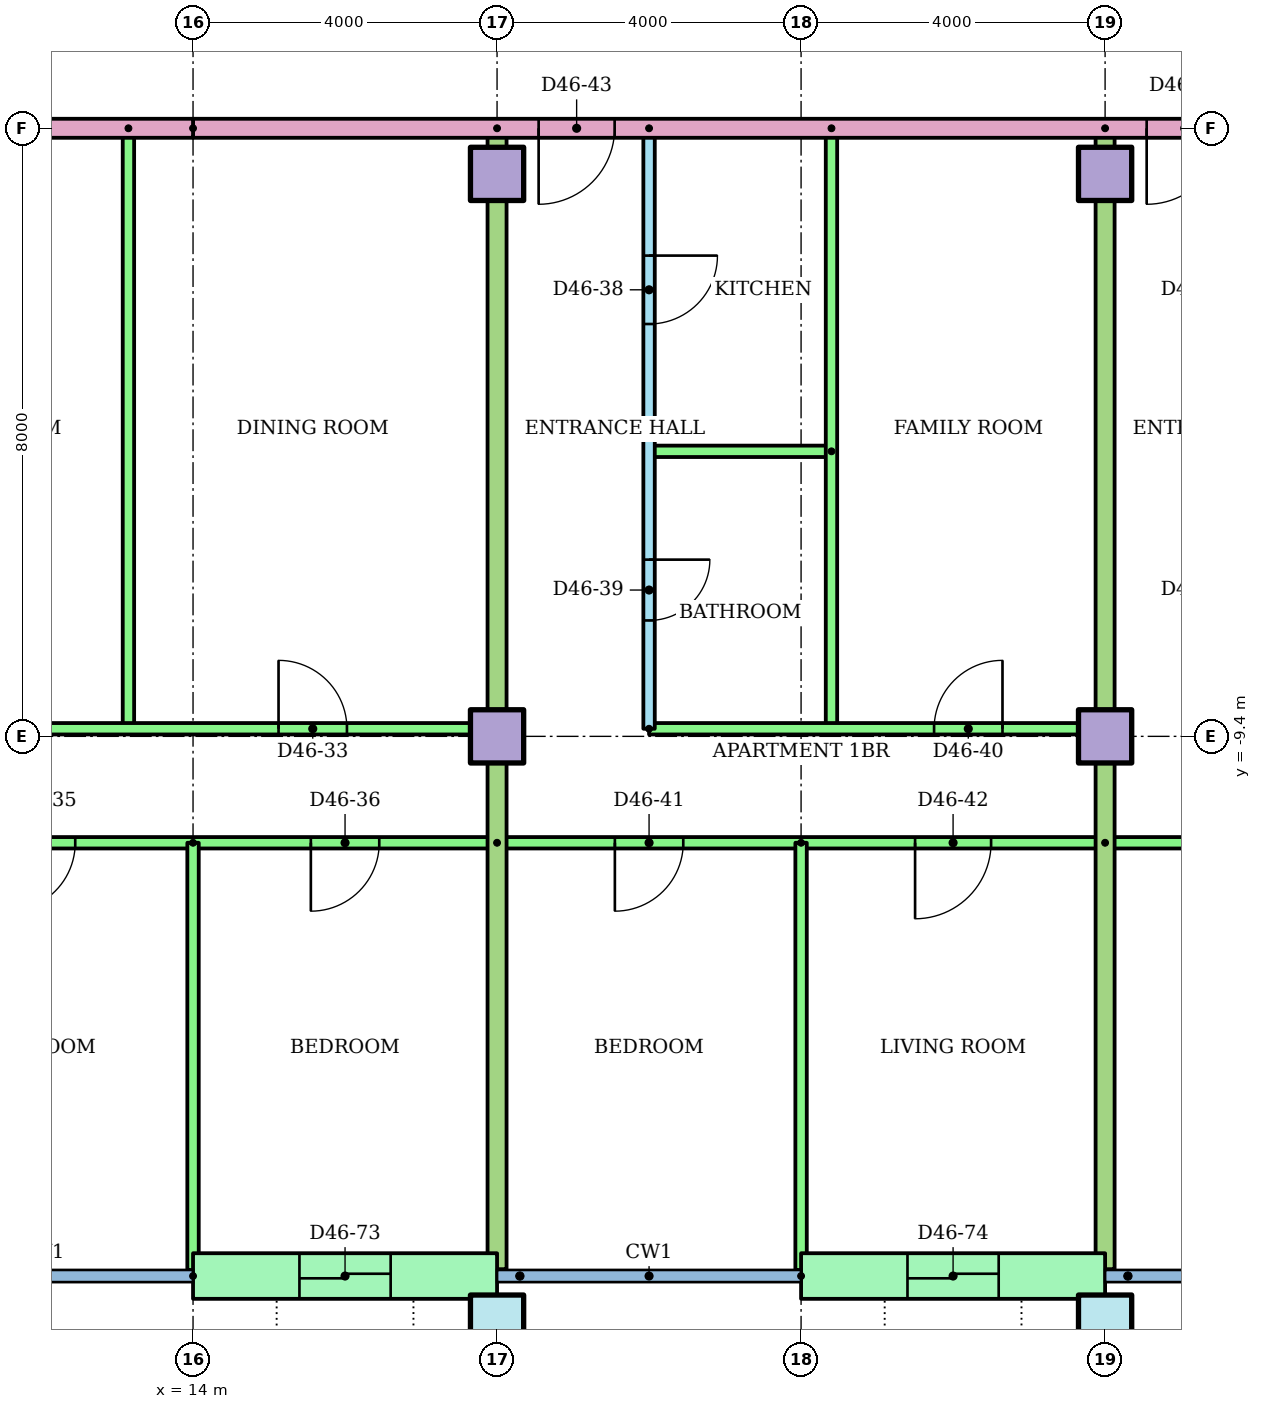
"""IFC4 building model, lengths in metres.
Left out: names, types, materials, properties, quantities, classifications, styles, units other than length and angle.
Written with IfcOpenShell. Run it as: python <this file> out.ifc"""

import sys

from ifc_helpers import new_model, si_unit, direction, frame, frame_2d, origin, origin_2d, place, context, subcontext, project, spatial, rectangle, hollow_rectangle, extrude, element, fill, save


model = new_model("IFC4")
c1 = context("Model", 3, precision=1e-05, world=origin(), true_north=direction((0.0, 1.0)))
c2 = subcontext(c1, "Body", "Model", "MODEL_VIEW")
j1 = project(units=[si_unit("LENGTHUNIT", "METRE"), si_unit("PLANEANGLEUNIT", "RADIAN")], contexts=[c1])
p1 = place(None, origin())
s1 = spatial("IfcSite", under=j1, at=p1, CompositionType="ELEMENT")
p2 = place(p1, origin())
s2 = spatial("IfcBuilding", under=s1, at=p2, CompositionType="ELEMENT")
p3 = place(p2, frame((0.0, 0.0, 178.1)))
s3 = spatial("IfcBuildingStorey", under=s2, at=p3, CompositionType="ELEMENT", Elevation=178.1)
for number, where in (
    (1, (18.0, -17.1, 0.0)),
    (2, (26.0, -17.1, 0.0)),
):
    element("IfcColumn", number, at=place(p3, frame(where)), inside=s3, PredefinedType="COLUMN", context=c2, shape_type="SweptSolid", body=[
        extrude(hollow_rectangle(XDim=0.7, YDim=0.7, WallThickness=0.036, at=origin_2d()), origin(), (0.0, 0.0, 1.0), 3.2),
    ])
for number, where in (
    (3, (18.0, -9.4, 0.0)),
    (4, (26.0, -9.4, 0.0)),
    (5, (18.0, -2.0, 0.0)),
    (6, (26.0, -2.0, 0.0)),
):
    element("IfcColumn", number, at=place(p3, frame(where)), inside=s3, PredefinedType="COLUMN", context=c2, shape_type="SweptSolid", body=[
        extrude(rectangle(XDim=0.7, YDim=0.7, at=origin_2d()), origin(), (0.0, 0.0, 1.0), 3.2),
    ])
p4 = place(p3, frame((14.0, -16.5, 0.0)))
e7 = element("IfcWall", 7, at=p4, inside=s3, PredefinedType="STANDARD", context=c2, shape_type="SweptSolid", body=[
    extrude(rectangle(XDim=4.0, YDim=0.6, at=frame_2d((2.0, 0.0))), origin(), (0.0, 0.0, 1.0), 2.92),
])
p5 = place(p4, frame((1.4, 0.0, 0.0)))
e8 = element("IfcOpeningElement", 8, at=p5, cuts=e7, PredefinedType="OPENING", context=c2, shape_type="SweptSolid", body=[
    extrude(rectangle(XDim=1.2, YDim=2.1, at=frame_2d((0.6, 1.05))), frame((0.0, 0.31, 0.0), z_axis=(0.0, -1.0, 0.0), x_axis=(1.0, 0.0, 0.0)), (0.0, 0.0, 1.0), 0.62),
])
p6 = place(p3, frame((22.0, -16.5, 0.0)))
e9 = element("IfcWall", 9, at=p6, inside=s3, PredefinedType="STANDARD", context=c2, shape_type="SweptSolid", body=[
    extrude(rectangle(XDim=4.0, YDim=0.6, at=frame_2d((2.0, 0.0))), origin(), (0.0, 0.0, 1.0), 2.92),
])
p7 = place(p6, frame((1.4, 0.0, 0.0)))
e10 = element("IfcOpeningElement", 10, at=p7, cuts=e9, PredefinedType="OPENING", context=c2, shape_type="SweptSolid", body=[
    extrude(rectangle(XDim=1.2, YDim=2.1, at=frame_2d((0.6, 1.05))), frame((0.0, 0.31, 0.0), z_axis=(0.0, -1.0, 0.0), x_axis=(1.0, 0.0, 0.0)), (0.0, 0.0, 1.0), 0.62),
])
p8 = place(p3, frame((13.15, -1.4, 0.0), z_axis=(0.0, 0.0, 1.0), x_axis=(0.0, -1.0, 0.0)))
e11 = element("IfcWall", 11, at=p8, inside=s3, PredefinedType="PARTITIONING", context=c2, shape_type="SweptSolid", body=[
    extrude(rectangle(XDim=7.9, YDim=0.15, at=frame_2d((3.95, 0.0))), origin(), (0.0, 0.0, 1.0), 2.4),
])
p9 = place(p3, frame((4.0, -9.3, 0.0)))
e12 = element("IfcWall", 12, at=p9, inside=s3, PredefinedType="PARTITIONING", context=c2, shape_type="SweptSolid", body=[
    extrude(rectangle(XDim=14.0, YDim=0.15, at=frame_2d((7.0, 0.0))), origin(), (0.0, 0.0, 1.0), 2.4),
])
p10 = place(p9, frame((3.45, 0.0, 0.0)))
e13 = element("IfcOpeningElement", 13, at=p10, cuts=e12, PredefinedType="OPENING", context=c2, shape_type="SweptSolid", body=[
    extrude(rectangle(XDim=0.9, YDim=2.1, at=frame_2d((0.45, 1.05))), frame((0.0, 0.085, 0.0), z_axis=(0.0, -1.0, 0.0), x_axis=(1.0, 0.0, 0.0)), (0.0, 0.0, 1.0), 0.17),
])
p11 = place(p9, frame((6.825, 0.0, 0.0)))
e14 = element("IfcOpeningElement", 14, at=p11, cuts=e12, PredefinedType="OPENING", context=c2, shape_type="SweptSolid", body=[
    extrude(rectangle(XDim=0.9, YDim=2.1, at=frame_2d((0.45, 1.05))), frame((0.0, 0.085, 0.0), z_axis=(0.0, -1.0, 0.0), x_axis=(1.0, 0.0, 0.0)), (0.0, 0.0, 1.0), 0.17),
])
p12 = place(p9, frame((11.125, 0.0, 0.0)))
e15 = element("IfcOpeningElement", 15, at=p12, cuts=e12, PredefinedType="OPENING", context=c2, shape_type="SweptSolid", body=[
    extrude(rectangle(XDim=0.9, YDim=2.1, at=frame_2d((0.45, 1.05))), frame((0.0, 0.085, 0.0), z_axis=(0.0, -1.0, 0.0), x_axis=(1.0, 0.0, 0.0)), (0.0, 0.0, 1.0), 0.17),
])
p13 = place(p3, frame((18.0, -10.8, 0.0), z_axis=(0.0, 0.0, 1.0), x_axis=(-1.0, 0.0, 0.0)))
e16 = element("IfcWall", 16, at=p13, inside=s3, PredefinedType="PARTITIONING", context=c2, shape_type="SweptSolid", body=[
    extrude(rectangle(XDim=16.0, YDim=0.15, at=frame_2d((8.0, 0.0))), origin(), (0.0, 0.0, 1.0), 2.4),
])
p14 = place(p13, frame((11.5, 0.0, 0.0)))
e17 = element("IfcOpeningElement", 17, at=p14, cuts=e16, PredefinedType="OPENING", context=c2, shape_type="SweptSolid", body=[
    extrude(rectangle(XDim=1.0, YDim=2.1, at=frame_2d((0.5, 1.05))), frame((0.0, 0.085, 0.0), z_axis=(0.0, -1.0, 0.0), x_axis=(1.0, 0.0, 0.0)), (0.0, 0.0, 1.0), 0.17),
])
p15 = place(p13, frame((5.55, 0.0, 0.0)))
e18 = element("IfcOpeningElement", 18, at=p15, cuts=e16, PredefinedType="OPENING", context=c2, shape_type="SweptSolid", body=[
    extrude(rectangle(XDim=0.9, YDim=2.1, at=frame_2d((0.45, 1.05))), frame((0.0, 0.085, 0.0), z_axis=(0.0, -1.0, 0.0), x_axis=(1.0, 0.0, 0.0)), (0.0, 0.0, 1.0), 0.17),
])
p16 = place(p13, frame((1.55, 0.0, 0.0)))
e19 = element("IfcOpeningElement", 19, at=p16, cuts=e16, PredefinedType="OPENING", context=c2, shape_type="SweptSolid", body=[
    extrude(rectangle(XDim=0.9, YDim=2.1, at=frame_2d((0.45, 1.05))), frame((0.0, 0.085, 0.0), z_axis=(0.0, -1.0, 0.0), x_axis=(1.0, 0.0, 0.0)), (0.0, 0.0, 1.0), 0.17),
])
p17 = place(p3, frame((14.0, -10.8, 0.0), z_axis=(0.0, 0.0, 1.0), x_axis=(0.0, -1.0, 0.0)))
e20 = element("IfcWall", 20, at=p17, inside=s3, PredefinedType="PARTITIONING", context=c2, shape_type="SweptSolid", body=[
    extrude(rectangle(XDim=5.621, YDim=0.15, at=frame_2d((2.811, 0.0))), origin(), (0.0, 0.0, 1.0), 2.4),
])
p18 = place(p3, frame((20.0, -1.4, 0.0), z_axis=(0.0, 0.0, 1.0), x_axis=(0.0, -1.0, 0.0)))
e21 = element("IfcWall", 21, at=p18, inside=s3, PredefinedType="PARTITIONING", context=c2, shape_type="SweptSolid", body=[
    extrude(rectangle(XDim=7.9, YDim=0.15, at=frame_2d((3.95, 0.0))), origin(), (0.0, 0.0, 1.0), 2.4),
])
p19 = place(p18, frame((1.675, 0.0, 0.0)))
e22 = element("IfcOpeningElement", 22, at=p19, cuts=e21, PredefinedType="OPENING", context=c2, shape_type="SweptSolid", body=[
    extrude(rectangle(XDim=0.9, YDim=2.1, at=frame_2d((0.45, 1.05))), frame((0.0, 0.085, 0.0), z_axis=(0.0, -1.0, 0.0), x_axis=(1.0, 0.0, 0.0)), (0.0, 0.0, 1.0), 0.17),
])
p20 = place(p18, frame((5.675, 0.0, 0.0)))
e23 = element("IfcOpeningElement", 23, at=p20, cuts=e21, PredefinedType="OPENING", context=c2, shape_type="SweptSolid", body=[
    extrude(rectangle(XDim=0.8, YDim=2.1, at=frame_2d((0.4, 1.05))), frame((0.0, 0.085, 0.0), z_axis=(0.0, -1.0, 0.0), x_axis=(1.0, 0.0, 0.0)), (0.0, 0.0, 1.0), 0.17),
])
p21 = place(p3, frame((22.4, -5.65, 0.0), z_axis=(0.0, 0.0, 1.0), x_axis=(-1.0, 0.0, 0.0)))
e24 = element("IfcWall", 24, at=p21, inside=s3, PredefinedType="PARTITIONING", context=c2, shape_type="SweptSolid", body=[
    extrude(rectangle(XDim=2.4, YDim=0.15, at=frame_2d((1.2, 0.0))), origin(), (0.0, 0.0, 1.0), 2.4),
])
p22 = place(p3, frame((22.4, -1.4, 0.0), z_axis=(0.0, 0.0, 1.0), x_axis=(0.0, -1.0, 0.0)))
e25 = element("IfcWall", 25, at=p22, inside=s3, PredefinedType="PARTITIONING", context=c2, shape_type="SweptSolid", body=[
    extrude(rectangle(XDim=7.9, YDim=0.15, at=frame_2d((3.95, 0.0))), origin(), (0.0, 0.0, 1.0), 2.4),
])
p23 = place(p3, frame((20.0, -9.3, 0.0)))
e26 = element("IfcWall", 26, at=p23, inside=s3, PredefinedType="PARTITIONING", context=c2, shape_type="SweptSolid", body=[
    extrude(rectangle(XDim=6.0, YDim=0.15, at=frame_2d((3.0, 0.0))), origin(), (0.0, 0.0, 1.0), 2.4),
])
p24 = place(p23, frame((3.75, 0.0, 0.0)))
e27 = element("IfcOpeningElement", 27, at=p24, cuts=e26, PredefinedType="OPENING", context=c2, shape_type="SweptSolid", body=[
    extrude(rectangle(XDim=0.9, YDim=2.1, at=frame_2d((0.45, 1.05))), frame((0.0, 0.085, 0.0), z_axis=(0.0, -1.0, 0.0), x_axis=(1.0, 0.0, 0.0)), (0.0, 0.0, 1.0), 0.17),
])
p25 = place(p3, frame((26.0, -10.8, 0.0), z_axis=(0.0, 0.0, 1.0), x_axis=(-1.0, 0.0, 0.0)))
e28 = element("IfcWall", 28, at=p25, inside=s3, PredefinedType="PARTITIONING", context=c2, shape_type="SweptSolid", body=[
    extrude(rectangle(XDim=8.0, YDim=0.15, at=frame_2d((4.0, 0.0))), origin(), (0.0, 0.0, 1.0), 2.4),
])
p26 = place(p25, frame((5.55, 0.0, 0.0)))
e29 = element("IfcOpeningElement", 29, at=p26, cuts=e28, PredefinedType="OPENING", context=c2, shape_type="SweptSolid", body=[
    extrude(rectangle(XDim=0.9, YDim=2.1, at=frame_2d((0.45, 1.05))), frame((0.0, 0.085, 0.0), z_axis=(0.0, -1.0, 0.0), x_axis=(1.0, 0.0, 0.0)), (0.0, 0.0, 1.0), 0.17),
])
p27 = place(p25, frame((1.5, 0.0, 0.0)))
e30 = element("IfcOpeningElement", 30, at=p27, cuts=e28, PredefinedType="OPENING", context=c2, shape_type="SweptSolid", body=[
    extrude(rectangle(XDim=1.0, YDim=2.1, at=frame_2d((0.5, 1.05))), frame((0.0, 0.085, 0.0), z_axis=(0.0, -1.0, 0.0), x_axis=(1.0, 0.0, 0.0)), (0.0, 0.0, 1.0), 0.17),
])
p28 = place(p3, frame((22.0, -10.8, 0.0), z_axis=(0.0, 0.0, 1.0), x_axis=(0.0, -1.0, 0.0)))
e31 = element("IfcWall", 31, at=p28, inside=s3, PredefinedType="PARTITIONING", context=c2, shape_type="SweptSolid", body=[
    extrude(rectangle(XDim=5.621, YDim=0.15, at=frame_2d((2.811, 0.0))), origin(), (0.0, 0.0, 1.0), 2.4),
])
p29 = place(p3, frame((18.0, -1.4, 0.0), z_axis=(0.0, 0.0, 1.0), x_axis=(0.0, -1.0, 0.0)))
e32 = element("IfcWall", 32, at=p29, inside=s3, PredefinedType="PARTITIONING", context=c2, shape_type="SweptSolid", body=[
    extrude(rectangle(XDim=15.01, YDim=0.25, at=frame_2d((7.505, 0.0))), origin(), (0.0, 0.0, 1.0), 2.4),
])
p30 = place(p3, frame((36.82, -10.8, 0.0), z_axis=(0.0, 0.0, 1.0), x_axis=(-1.0, 0.0, 0.0)))
e33 = element("IfcWall", 33, at=p30, inside=s3, PredefinedType="PARTITIONING", context=c2, shape_type="SweptSolid", body=[
    extrude(rectangle(XDim=10.82, YDim=0.15, at=frame_2d((5.41, 0.0))), origin(), (0.0, 0.0, 1.0), 2.4),
])
p31 = place(p30, frame((7.27, 0.0, 0.0)))
e34 = element("IfcOpeningElement", 34, at=p31, cuts=e33, PredefinedType="OPENING", context=c2, shape_type="SweptSolid", body=[
    extrude(rectangle(XDim=1.0, YDim=2.1, at=frame_2d((0.5, 1.05))), frame((0.0, 0.085, 0.0), z_axis=(0.0, -1.0, 0.0), x_axis=(1.0, 0.0, 0.0)), (0.0, 0.0, 1.0), 0.17),
])
p32 = place(p30, frame((1.373, 0.0, 0.0)))
e35 = element("IfcOpeningElement", 35, at=p32, cuts=e33, PredefinedType="OPENING", context=c2, shape_type="SweptSolid", body=[
    extrude(rectangle(XDim=0.9, YDim=2.1, at=frame_2d((0.45, 1.05))), frame((0.0, 0.085, 0.0), z_axis=(0.0, -1.0, 0.0), x_axis=(1.0, 0.0, 0.0)), (0.0, 0.0, 1.0), 0.17),
])
p33 = place(p3, frame((26.0, -1.4, 0.0), z_axis=(0.0, 0.0, 1.0), x_axis=(0.0, -1.0, 0.0)))
e36 = element("IfcWall", 36, at=p33, inside=s3, PredefinedType="PARTITIONING", context=c2, shape_type="SweptSolid", body=[
    extrude(rectangle(XDim=15.01, YDim=0.25, at=frame_2d((7.505, 0.0))), origin(), (0.0, 0.0, 1.0), 2.4),
])
p34 = place(p3, frame((29.0, -1.4, 0.0), z_axis=(0.0, 0.0, 1.0), x_axis=(-1.0, 0.0, 0.0)))
e37 = element("IfcWall", 37, at=p34, inside=s3, PredefinedType="PARTITIONING", context=c2, shape_type="SweptSolid", body=[
    extrude(rectangle(XDim=15.0, YDim=0.25, at=frame_2d((7.5, 0.0))), origin(), (0.0, 0.0, 1.0), 2.4),
])
p35 = place(p34, frame((9.453, 0.0, 0.0)))
e38 = element("IfcOpeningElement", 38, at=p35, cuts=e37, PredefinedType="OPENING", context=c2, shape_type="SweptSolid", body=[
    extrude(rectangle(XDim=1.0, YDim=2.1, at=frame_2d((0.5, 1.05))), frame((0.0, 0.135, 0.0), z_axis=(0.0, -1.0, 0.0), x_axis=(1.0, 0.0, 0.0)), (0.0, 0.0, 1.0), 0.27),
])
p36 = place(p34, frame((1.453, 0.0, 0.0)))
e39 = element("IfcOpeningElement", 39, at=p36, cuts=e37, PredefinedType="OPENING", context=c2, shape_type="SweptSolid", body=[
    extrude(rectangle(XDim=1.0, YDim=2.1, at=frame_2d((0.5, 1.05))), frame((0.0, 0.135, 0.0), z_axis=(0.0, -1.0, 0.0), x_axis=(1.0, 0.0, 0.0)), (0.0, 0.0, 1.0), 0.27),
])
p37 = place(p3, frame((14.0, -1.4, 0.0), z_axis=(0.0, 0.0, 1.0), x_axis=(-1.0, 0.0, 0.0)))
e40 = element("IfcWall", 40, at=p37, inside=s3, PredefinedType="PARTITIONING", context=c2, shape_type="SweptSolid", body=[
    extrude(rectangle(XDim=28.0, YDim=0.25, at=frame_2d((14.0, 0.0))), origin(), (0.0, 0.0, 1.0), 2.4),
])
p38 = place(p37, frame((12.547, 0.0, 0.0)))
e41 = element("IfcOpeningElement", 41, at=p38, cuts=e40, PredefinedType="OPENING", context=c2, shape_type="SweptSolid", body=[
    extrude(rectangle(XDim=1.0, YDim=2.1, at=frame_2d((0.5, 1.05))), frame((0.0, 0.135, 0.0), z_axis=(0.0, -1.0, 0.0), x_axis=(1.0, 0.0, 0.0)), (0.0, 0.0, 1.0), 0.27),
])
p39 = place(p37, frame((10.453, 0.0, 0.0)))
e42 = element("IfcOpeningElement", 42, at=p39, cuts=e40, PredefinedType="OPENING", context=c2, shape_type="SweptSolid", body=[
    extrude(rectangle(XDim=1.0, YDim=2.1, at=frame_2d((0.5, 1.05))), frame((0.0, 0.135, 0.0), z_axis=(0.0, -1.0, 0.0), x_axis=(1.0, 0.0, 0.0)), (0.0, 0.0, 1.0), 0.27),
])
p40 = place(p12, origin())
e43 = element("IfcDoor", 43, at=p40, inside=s3, OperationType="SINGLE_SWING_LEFT", PredefinedType="DOOR", context=c2, shape_type="SweptSolid", body=[
    extrude(rectangle(XDim=0.9, YDim=2.1, at=frame_2d((0.45, 1.05))), frame((0.0, 0.025, 0.0), z_axis=(0.0, -1.0, 0.0), x_axis=(1.0, 0.0, 0.0)), (0.0, 0.0, 1.0), 0.05),
])
fill(e15, e43)
p41 = place(p15, origin())
e44 = element("IfcDoor", 44, at=p41, inside=s3, OperationType="SINGLE_SWING_RIGHT", PredefinedType="DOOR", context=c2, shape_type="SweptSolid", body=[
    extrude(rectangle(XDim=0.9, YDim=2.1, at=frame_2d((0.45, 1.05))), frame((0.0, 0.025, 0.0), z_axis=(0.0, -1.0, 0.0), x_axis=(1.0, 0.0, 0.0)), (0.0, 0.0, 1.0), 0.05),
])
fill(e18, e44)
p42 = place(p16, origin())
e45 = element("IfcDoor", 45, at=p42, inside=s3, OperationType="SINGLE_SWING_RIGHT", PredefinedType="DOOR", context=c2, shape_type="SweptSolid", body=[
    extrude(rectangle(XDim=0.9, YDim=2.1, at=frame_2d((0.45, 1.05))), frame((0.0, 0.025, 0.0), z_axis=(0.0, -1.0, 0.0), x_axis=(1.0, 0.0, 0.0)), (0.0, 0.0, 1.0), 0.05),
])
fill(e19, e45)
p43 = place(p19, origin())
e46 = element("IfcDoor", 46, at=p43, inside=s3, OperationType="SINGLE_SWING_LEFT", PredefinedType="DOOR", context=c2, shape_type="SweptSolid", body=[
    extrude(rectangle(XDim=0.9, YDim=2.1, at=frame_2d((0.45, 1.05))), frame((0.0, 0.025, 0.0), z_axis=(0.0, -1.0, 0.0), x_axis=(1.0, 0.0, 0.0)), (0.0, 0.0, 1.0), 0.05),
])
fill(e22, e46)
p44 = place(p20, origin())
e47 = element("IfcDoor", 47, at=p44, inside=s3, OperationType="SINGLE_SWING_LEFT", PredefinedType="DOOR", context=c2, shape_type="SweptSolid", body=[
    extrude(rectangle(XDim=0.8, YDim=2.1, at=frame_2d((0.4, 1.05))), frame((0.0, 0.025, 0.0), z_axis=(0.0, -1.0, 0.0), x_axis=(1.0, 0.0, 0.0)), (0.0, 0.0, 1.0), 0.05),
])
fill(e23, e47)
p45 = place(p24, origin())
e48 = element("IfcDoor", 48, at=p45, inside=s3, OperationType="SINGLE_SWING_RIGHT", PredefinedType="DOOR", context=c2, shape_type="SweptSolid", body=[
    extrude(rectangle(XDim=0.9, YDim=2.1, at=frame_2d((0.45, 1.05))), frame((0.0, 0.025, 0.0), z_axis=(0.0, -1.0, 0.0), x_axis=(1.0, 0.0, 0.0)), (0.0, 0.0, 1.0), 0.05),
])
fill(e27, e48)
p46 = place(p26, origin())
e49 = element("IfcDoor", 49, at=p46, inside=s3, OperationType="SINGLE_SWING_RIGHT", PredefinedType="DOOR", context=c2, shape_type="SweptSolid", body=[
    extrude(rectangle(XDim=0.9, YDim=2.1, at=frame_2d((0.45, 1.05))), frame((0.0, 0.025, 0.0), z_axis=(0.0, -1.0, 0.0), x_axis=(1.0, 0.0, 0.0)), (0.0, 0.0, 1.0), 0.05),
])
fill(e29, e49)
p47 = place(p27, origin())
e50 = element("IfcDoor", 50, at=p47, inside=s3, OperationType="SINGLE_SWING_RIGHT", PredefinedType="DOOR", context=c2, shape_type="SweptSolid", body=[
    extrude(rectangle(XDim=1.0, YDim=2.1, at=frame_2d((0.5, 1.05))), frame((0.0, 0.025, 0.0), z_axis=(0.0, -1.0, 0.0), x_axis=(1.0, 0.0, 0.0)), (0.0, 0.0, 1.0), 0.05),
])
fill(e30, e50)
p48 = place(p35, origin())
e51 = element("IfcDoor", 51, at=p48, inside=s3, OperationType="SINGLE_SWING_RIGHT", PredefinedType="DOOR", context=c2, shape_type="SweptSolid", body=[
    extrude(rectangle(XDim=1.0, YDim=2.1, at=frame_2d((0.5, 1.05))), frame((0.0, 0.025, 0.0), z_axis=(0.0, -1.0, 0.0), x_axis=(1.0, 0.0, 0.0)), (0.0, 0.0, 1.0), 0.05),
])
fill(e38, e51)
p49 = place(p36, origin())
e52 = element("IfcDoor", 52, at=p49, inside=s3, OperationType="SINGLE_SWING_RIGHT", PredefinedType="DOOR", context=c2, shape_type="SweptSolid", body=[
    extrude(rectangle(XDim=1.0, YDim=2.1, at=frame_2d((0.5, 1.05))), frame((0.0, 0.025, 0.0), z_axis=(0.0, -1.0, 0.0), x_axis=(1.0, 0.0, 0.0)), (0.0, 0.0, 1.0), 0.05),
])
fill(e39, e52)
p50 = place(p5, origin())
e53 = element("IfcDoor", 53, at=p50, inside=s3, OperationType="SLIDING_TO_LEFT", PredefinedType="DOOR", context=c2, shape_type="SweptSolid", body=[
    extrude(rectangle(XDim=1.2, YDim=2.1, at=frame_2d((0.6, 1.05))), frame((0.0, 0.025, 0.0), z_axis=(0.0, -1.0, 0.0), x_axis=(1.0, 0.0, 0.0)), (0.0, 0.0, 1.0), 0.05),
])
fill(e8, e53)
p51 = place(p7, origin())
e54 = element("IfcDoor", 54, at=p51, inside=s3, OperationType="SLIDING_TO_LEFT", PredefinedType="DOOR", context=c2, shape_type="SweptSolid", body=[
    extrude(rectangle(XDim=1.2, YDim=2.1, at=frame_2d((0.6, 1.05))), frame((0.0, 0.025, 0.0), z_axis=(0.0, -1.0, 0.0), x_axis=(1.0, 0.0, 0.0)), (0.0, 0.0, 1.0), 0.05),
])
fill(e10, e54)
save(model, sys.argv[1])
